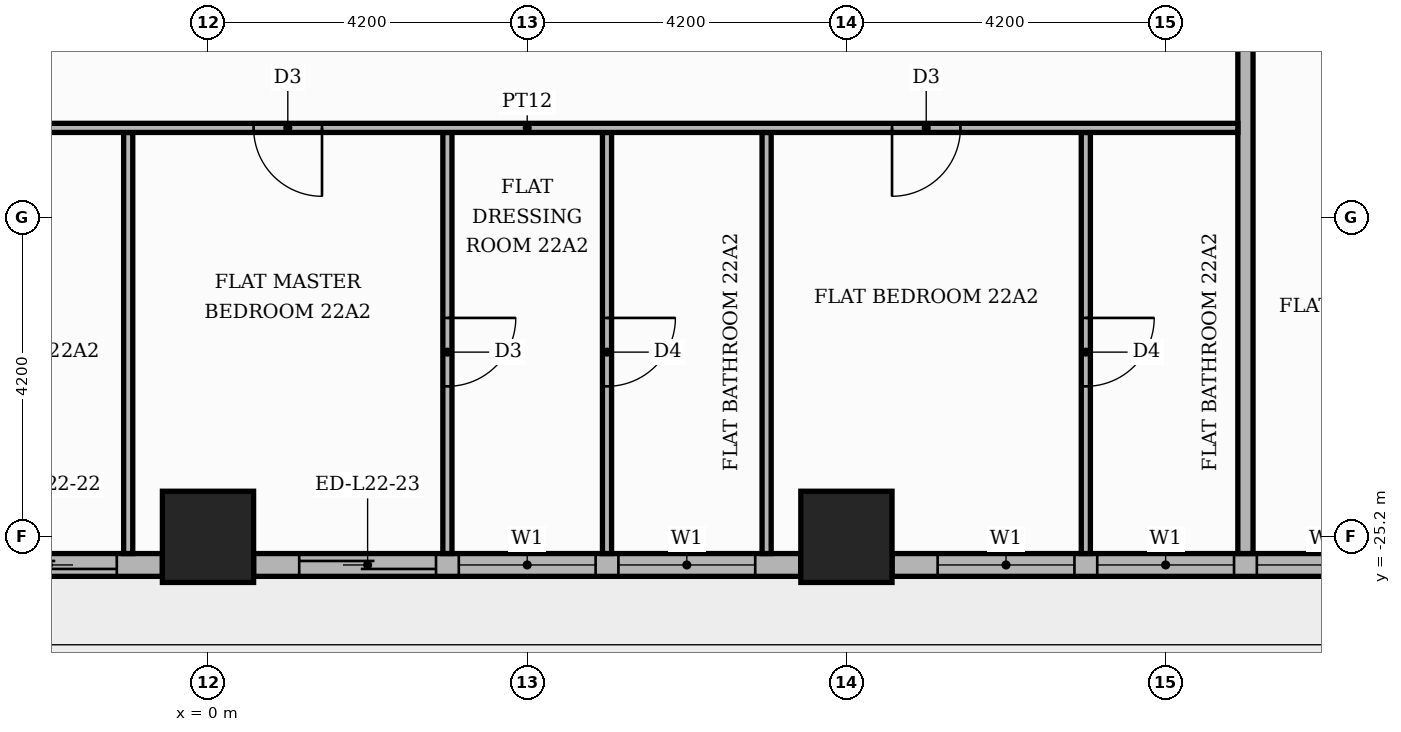
"""IFC4 building model, lengths in metres.
Left out: names, types, materials, properties, quantities, classifications, styles, units other than length and angle.
Written with IfcOpenShell. Run it as: python <this file> out.ifc"""

import sys

from ifc_helpers import new_model, si_unit, direction, frame, frame_2d, origin, origin_2d, place, context, subcontext, project, spatial, rectangle, extrude, element, fill, save


model = new_model("IFC4")
c1 = context("Model", 3, precision=1e-05, world=origin(), true_north=direction((0.0, 1.0)))
c2 = subcontext(c1, "Body", "Model", "MODEL_VIEW")
j1 = project(units=[si_unit("LENGTHUNIT", "METRE"), si_unit("PLANEANGLEUNIT", "RADIAN")], contexts=[c1])
p1 = place(None, origin())
s1 = spatial("IfcSite", under=j1, at=p1, CompositionType="ELEMENT")
p2 = place(p1, origin())
s2 = spatial("IfcBuilding", under=s1, at=p2, CompositionType="ELEMENT")
p3 = place(p2, frame((0.0, 0.0, 94.8)))
s3 = spatial("IfcBuildingStorey", under=s2, at=p3, CompositionType="ELEMENT", Elevation=94.8)
for number, where, z_axis, x_axis in (
    (1, (0.0, -25.2, 0.0), (0.0, 0.0, 1.0), (1.0, 0.0, 0.0)),
    (2, (8.4, -25.2, 0.0), (0.0, 0.0, 1.0), (1.0, 0.0, 0.0)),
):
    element("IfcColumn", number, at=place(p3, frame(where, z_axis=z_axis, x_axis=x_axis)), inside=s3, PredefinedType="COLUMN", context=c2, shape_type="SweptSolid", body=[
        extrude(rectangle(XDim=1.2, YDim=1.2, at=origin_2d()), origin(), (0.0, 0.0, 1.0), 3.9),
    ])
p4 = place(p3, frame((-7.8, -25.57, 0.0), z_axis=(0.0, 0.0, 1.0), x_axis=(1.0, 0.0, 0.0)))
e3 = element("IfcWall", 3, at=p4, inside=s3, PredefinedType="STANDARD", context=c2, shape_type="SweptSolid", body=[
    extrude(rectangle(XDim=7.2, YDim=0.3, at=frame_2d((3.6, 0.0))), origin(), (0.0, 0.0, 1.0), 3.48),
])
p5 = place(p4, frame((0.6, 0.0, 0.9)))
e4 = element("IfcOpeningElement", 4, at=p5, cuts=e3, PredefinedType="OPENING", context=c2, shape_type="SweptSolid", body=[
    extrude(rectangle(XDim=1.8, YDim=2.1, at=frame_2d((0.9, 1.05))), frame((0.0, 0.16, 0.0), z_axis=(0.0, -1.0, 0.0), x_axis=(1.0, 0.0, 0.0)), (0.0, 0.0, 1.0), 0.32),
])
p6 = place(p4, frame((2.7, 0.0, 0.9)))
e5 = element("IfcOpeningElement", 5, at=p6, cuts=e3, PredefinedType="OPENING", context=c2, shape_type="SweptSolid", body=[
    extrude(rectangle(XDim=1.8, YDim=2.1, at=frame_2d((0.9, 1.05))), frame((0.0, 0.16, 0.0), z_axis=(0.0, -1.0, 0.0), x_axis=(1.0, 0.0, 0.0)), (0.0, 0.0, 1.0), 0.32),
])
p7 = place(p4, frame((4.8, 0.0, 0.0)))
e6 = element("IfcOpeningElement", 6, at=p7, cuts=e3, PredefinedType="OPENING", context=c2, shape_type="SweptSolid", body=[
    extrude(rectangle(XDim=1.8, YDim=2.4, at=frame_2d((0.9, 1.2))), frame((0.0, 0.16, 0.0), z_axis=(0.0, -1.0, 0.0), x_axis=(1.0, 0.0, 0.0)), (0.0, 0.0, 1.0), 0.32),
])
p8 = place(p3, frame((0.6, -25.57, 0.0), z_axis=(0.0, 0.0, 1.0), x_axis=(1.0, 0.0, 0.0)))
e7 = element("IfcWall", 7, at=p8, inside=s3, PredefinedType="STANDARD", context=c2, shape_type="SweptSolid", body=[
    extrude(rectangle(XDim=7.2, YDim=0.3, at=frame_2d((3.6, 0.0))), origin(), (0.0, 0.0, 1.0), 3.48),
])
p9 = place(p8, frame((0.6, 0.0, 0.0)))
e8 = element("IfcOpeningElement", 8, at=p9, cuts=e7, PredefinedType="OPENING", context=c2, shape_type="SweptSolid", body=[
    extrude(rectangle(XDim=1.8, YDim=2.4, at=frame_2d((0.9, 1.2))), frame((0.0, 0.16, 0.0), z_axis=(0.0, -1.0, 0.0), x_axis=(1.0, 0.0, 0.0)), (0.0, 0.0, 1.0), 0.32),
])
p10 = place(p8, frame((2.7, 0.0, 0.9)))
e9 = element("IfcOpeningElement", 9, at=p10, cuts=e7, PredefinedType="OPENING", context=c2, shape_type="SweptSolid", body=[
    extrude(rectangle(XDim=1.8, YDim=2.1, at=frame_2d((0.9, 1.05))), frame((0.0, 0.16, 0.0), z_axis=(0.0, -1.0, 0.0), x_axis=(1.0, 0.0, 0.0)), (0.0, 0.0, 1.0), 0.32),
])
p11 = place(p8, frame((4.8, 0.0, 0.9)))
e10 = element("IfcOpeningElement", 10, at=p11, cuts=e7, PredefinedType="OPENING", context=c2, shape_type="SweptSolid", body=[
    extrude(rectangle(XDim=1.8, YDim=2.1, at=frame_2d((0.9, 1.05))), frame((0.0, 0.16, 0.0), z_axis=(0.0, -1.0, 0.0), x_axis=(1.0, 0.0, 0.0)), (0.0, 0.0, 1.0), 0.32),
])
p12 = place(p3, frame((9.0, -25.57, 0.0), z_axis=(0.0, 0.0, 1.0), x_axis=(1.0, 0.0, 0.0)))
e11 = element("IfcWall", 11, at=p12, inside=s3, PredefinedType="STANDARD", context=c2, shape_type="SweptSolid", body=[
    extrude(rectangle(XDim=7.2, YDim=0.3, at=frame_2d((3.6, 0.0))), origin(), (0.0, 0.0, 1.0), 3.48),
])
p13 = place(p12, frame((0.6, 0.0, 0.9)))
e12 = element("IfcOpeningElement", 12, at=p13, cuts=e11, PredefinedType="OPENING", context=c2, shape_type="SweptSolid", body=[
    extrude(rectangle(XDim=1.8, YDim=2.1, at=frame_2d((0.9, 1.05))), frame((0.0, 0.16, 0.0), z_axis=(0.0, -1.0, 0.0), x_axis=(1.0, 0.0, 0.0)), (0.0, 0.0, 1.0), 0.32),
])
p14 = place(p12, frame((2.7, 0.0, 0.9)))
e13 = element("IfcOpeningElement", 13, at=p14, cuts=e11, PredefinedType="OPENING", context=c2, shape_type="SweptSolid", body=[
    extrude(rectangle(XDim=1.8, YDim=2.1, at=frame_2d((0.9, 1.05))), frame((0.0, 0.16, 0.0), z_axis=(0.0, -1.0, 0.0), x_axis=(1.0, 0.0, 0.0)), (0.0, 0.0, 1.0), 0.32),
])
p15 = place(p12, frame((4.8, 0.0, 0.9)))
e14 = element("IfcOpeningElement", 14, at=p15, cuts=e11, PredefinedType="OPENING", context=c2, shape_type="SweptSolid", body=[
    extrude(rectangle(XDim=1.8, YDim=2.1, at=frame_2d((0.9, 1.05))), frame((0.0, 0.16, 0.0), z_axis=(0.0, -1.0, 0.0), x_axis=(1.0, 0.0, 0.0)), (0.0, 0.0, 1.0), 0.32),
])
p16 = place(p3, frame((-1.05, -25.42, 0.0), z_axis=(0.0, 0.0, 1.0), x_axis=(0.0, 1.0, 0.0)))
e15 = element("IfcWall", 15, at=p16, inside=s3, PredefinedType="PARTITIONING", context=c2, shape_type="SweptSolid", body=[
    extrude(rectangle(XDim=5.54, YDim=0.12, at=frame_2d((2.77, 0.0))), origin(), (0.0, 0.0, 1.0), 3.48),
])
p17 = place(p3, frame((3.15, -25.42, 0.0), z_axis=(0.0, 0.0, 1.0), x_axis=(0.0, 1.0, 0.0)))
e16 = element("IfcWall", 16, at=p17, inside=s3, PredefinedType="PARTITIONING", context=c2, shape_type="SweptSolid", body=[
    extrude(rectangle(XDim=5.54, YDim=0.12, at=frame_2d((2.77, 0.0))), origin(), (0.0, 0.0, 1.0), 3.48),
])
p18 = place(p17, frame((2.2, 0.0, 0.0)))
e17 = element("IfcOpeningElement", 17, at=p18, cuts=e16, PredefinedType="OPENING", context=c2, shape_type="SweptSolid", body=[
    extrude(rectangle(XDim=0.9, YDim=2.1, at=frame_2d((0.45, 1.05))), frame((0.0, 0.07, 0.0), z_axis=(0.0, -1.0, 0.0), x_axis=(1.0, 0.0, 0.0)), (0.0, 0.0, 1.0), 0.14),
])
p19 = place(p3, frame((5.25, -25.42, 0.0), z_axis=(0.0, 0.0, 1.0), x_axis=(0.0, 1.0, 0.0)))
e18 = element("IfcWall", 18, at=p19, inside=s3, PredefinedType="PARTITIONING", context=c2, shape_type="SweptSolid", body=[
    extrude(rectangle(XDim=5.54, YDim=0.12, at=frame_2d((2.77, 0.0))), origin(), (0.0, 0.0, 1.0), 3.48),
])
p20 = place(p19, frame((2.2, 0.0, 0.0)))
e19 = element("IfcOpeningElement", 19, at=p20, cuts=e18, PredefinedType="OPENING", context=c2, shape_type="SweptSolid", body=[
    extrude(rectangle(XDim=0.9, YDim=2.1, at=frame_2d((0.45, 1.05))), frame((0.0, 0.07, 0.0), z_axis=(0.0, -1.0, 0.0), x_axis=(1.0, 0.0, 0.0)), (0.0, 0.0, 1.0), 0.14),
])
p21 = place(p3, frame((7.35, -25.42, 0.0), z_axis=(0.0, 0.0, 1.0), x_axis=(0.0, 1.0, 0.0)))
e20 = element("IfcWall", 20, at=p21, inside=s3, PredefinedType="PARTITIONING", context=c2, shape_type="SweptSolid", body=[
    extrude(rectangle(XDim=5.54, YDim=0.12, at=frame_2d((2.77, 0.0))), origin(), (0.0, 0.0, 1.0), 3.48),
])
p22 = place(p3, frame((11.55, -25.42, 0.0), z_axis=(0.0, 0.0, 1.0), x_axis=(0.0, 1.0, 0.0)))
e21 = element("IfcWall", 21, at=p22, inside=s3, PredefinedType="PARTITIONING", context=c2, shape_type="SweptSolid", body=[
    extrude(rectangle(XDim=5.54, YDim=0.12, at=frame_2d((2.77, 0.0))), origin(), (0.0, 0.0, 1.0), 3.48),
])
p23 = place(p22, frame((2.2, 0.0, 0.0)))
e22 = element("IfcOpeningElement", 22, at=p23, cuts=e21, PredefinedType="OPENING", context=c2, shape_type="SweptSolid", body=[
    extrude(rectangle(XDim=0.9, YDim=2.1, at=frame_2d((0.45, 1.05))), frame((0.0, 0.07, 0.0), z_axis=(0.0, -1.0, 0.0), x_axis=(1.0, 0.0, 0.0)), (0.0, 0.0, 1.0), 0.14),
])
p24 = place(p3, frame((13.65, -25.42, 0.0), z_axis=(0.0, 0.0, 1.0), x_axis=(0.0, 1.0, 0.0)))
e23 = element("IfcWall", 23, at=p24, inside=s3, PredefinedType="PARTITIONING", context=c2, shape_type="SweptSolid", body=[
    extrude(rectangle(XDim=11.67, YDim=0.2, at=frame_2d((5.835, 0.0))), origin(), (0.0, 0.0, 1.0), 3.48),
])
p25 = place(p3, frame((-5.15, -19.82, 0.0), z_axis=(0.0, 0.0, 1.0), x_axis=(1.0, 0.0, 0.0)))
e24 = element("IfcWall", 24, at=p25, inside=s3, PredefinedType="PARTITIONING", context=c2, shape_type="SweptSolid", body=[
    extrude(rectangle(XDim=18.7, YDim=0.12, at=frame_2d((9.35, 0.0))), origin(), (0.0, 0.0, 1.0), 3.48),
])
p26 = place(p25, frame((1.5, 0.0, 0.0)))
e25 = element("IfcOpeningElement", 25, at=p26, cuts=e24, PredefinedType="OPENING", context=c2, shape_type="SweptSolid", body=[
    extrude(rectangle(XDim=1.0, YDim=2.1, at=frame_2d((0.5, 1.05))), frame((0.0, 0.07, 0.0), z_axis=(0.0, -1.0, 0.0), x_axis=(1.0, 0.0, 0.0)), (0.0, 0.0, 1.0), 0.14),
])
p27 = place(p25, frame((5.75, 0.0, 0.0)))
e26 = element("IfcOpeningElement", 26, at=p27, cuts=e24, PredefinedType="OPENING", context=c2, shape_type="SweptSolid", body=[
    extrude(rectangle(XDim=0.9, YDim=2.1, at=frame_2d((0.45, 1.05))), frame((0.0, 0.07, 0.0), z_axis=(0.0, -1.0, 0.0), x_axis=(1.0, 0.0, 0.0)), (0.0, 0.0, 1.0), 0.14),
])
p28 = place(p25, frame((14.15, 0.0, 0.0)))
e27 = element("IfcOpeningElement", 27, at=p28, cuts=e24, PredefinedType="OPENING", context=c2, shape_type="SweptSolid", body=[
    extrude(rectangle(XDim=0.9, YDim=2.1, at=frame_2d((0.45, 1.05))), frame((0.0, 0.07, 0.0), z_axis=(0.0, -1.0, 0.0), x_axis=(1.0, 0.0, 0.0)), (0.0, 0.0, 1.0), 0.14),
])
p29 = place(p7, origin())
e28 = element("IfcDoor", 28, at=p29, inside=s3, OperationType="SLIDING_TO_RIGHT", PredefinedType="DOOR", context=c2, shape_type="SweptSolid", body=[
    extrude(rectangle(XDim=1.8, YDim=2.4, at=frame_2d((0.9, 1.2))), frame((0.0, 0.025, 0.0), z_axis=(0.0, -1.0, 0.0), x_axis=(1.0, 0.0, 0.0)), (0.0, 0.0, 1.0), 0.05),
])
fill(e6, e28)
p30 = place(p9, origin())
e29 = element("IfcDoor", 29, at=p30, inside=s3, OperationType="SLIDING_TO_LEFT", PredefinedType="DOOR", context=c2, shape_type="SweptSolid", body=[
    extrude(rectangle(XDim=1.8, YDim=2.4, at=frame_2d((0.9, 1.2))), frame((0.0, 0.025, 0.0), z_axis=(0.0, -1.0, 0.0), x_axis=(1.0, 0.0, 0.0)), (0.0, 0.0, 1.0), 0.05),
])
fill(e8, e29)
p31 = place(p10, origin())
e30 = element("IfcWindow", 30, at=p31, inside=s3, PartitioningType="SINGLE_PANEL", PredefinedType="WINDOW", context=c2, shape_type="SweptSolid", body=[
    extrude(rectangle(XDim=1.8, YDim=2.1, at=frame_2d((0.9, 1.05))), frame((0.0, 0.03, 0.0), z_axis=(0.0, -1.0, 0.0), x_axis=(1.0, 0.0, 0.0)), (0.0, 0.0, 1.0), 0.06),
])
fill(e9, e30)
p32 = place(p11, origin())
e31 = element("IfcWindow", 31, at=p32, inside=s3, PartitioningType="SINGLE_PANEL", PredefinedType="WINDOW", context=c2, shape_type="SweptSolid", body=[
    extrude(rectangle(XDim=1.8, YDim=2.1, at=frame_2d((0.9, 1.05))), frame((0.0, 0.03, 0.0), z_axis=(0.0, -1.0, 0.0), x_axis=(1.0, 0.0, 0.0)), (0.0, 0.0, 1.0), 0.06),
])
fill(e10, e31)
p33 = place(p13, origin())
e32 = element("IfcWindow", 32, at=p33, inside=s3, PartitioningType="SINGLE_PANEL", PredefinedType="WINDOW", context=c2, shape_type="SweptSolid", body=[
    extrude(rectangle(XDim=1.8, YDim=2.1, at=frame_2d((0.9, 1.05))), frame((0.0, 0.03, 0.0), z_axis=(0.0, -1.0, 0.0), x_axis=(1.0, 0.0, 0.0)), (0.0, 0.0, 1.0), 0.06),
])
fill(e12, e32)
p34 = place(p14, origin())
e33 = element("IfcWindow", 33, at=p34, inside=s3, PartitioningType="SINGLE_PANEL", PredefinedType="WINDOW", context=c2, shape_type="SweptSolid", body=[
    extrude(rectangle(XDim=1.8, YDim=2.1, at=frame_2d((0.9, 1.05))), frame((0.0, 0.03, 0.0), z_axis=(0.0, -1.0, 0.0), x_axis=(1.0, 0.0, 0.0)), (0.0, 0.0, 1.0), 0.06),
])
fill(e13, e33)
p35 = place(p15, origin())
e34 = element("IfcWindow", 34, at=p35, inside=s3, PartitioningType="SINGLE_PANEL", PredefinedType="WINDOW", context=c2, shape_type="SweptSolid", body=[
    extrude(rectangle(XDim=1.8, YDim=2.1, at=frame_2d((0.9, 1.05))), frame((0.0, 0.03, 0.0), z_axis=(0.0, -1.0, 0.0), x_axis=(1.0, 0.0, 0.0)), (0.0, 0.0, 1.0), 0.06),
])
fill(e14, e34)
p36 = place(p27, frame((0.9, 0.0, 0.0), z_axis=(0.0, 0.0, 1.0), x_axis=(-1.0, 0.0, 0.0)))
e35 = element("IfcDoor", 35, at=p36, inside=s3, OperationType="SINGLE_SWING_RIGHT", PredefinedType="DOOR", context=c2, shape_type="SweptSolid", body=[
    extrude(rectangle(XDim=0.9, YDim=2.1, at=frame_2d((0.45, 1.05))), frame((0.0, 0.025, 0.0), z_axis=(0.0, -1.0, 0.0), x_axis=(1.0, 0.0, 0.0)), (0.0, 0.0, 1.0), 0.05),
])
fill(e26, e35)
p37 = place(p18, frame((0.9, 0.0, 0.0), z_axis=(0.0, 0.0, 1.0), x_axis=(-1.0, 0.0, 0.0)))
e36 = element("IfcDoor", 36, at=p37, inside=s3, OperationType="SINGLE_SWING_RIGHT", PredefinedType="DOOR", context=c2, shape_type="SweptSolid", body=[
    extrude(rectangle(XDim=0.9, YDim=2.1, at=frame_2d((0.45, 1.05))), frame((0.0, 0.025, 0.0), z_axis=(0.0, -1.0, 0.0), x_axis=(1.0, 0.0, 0.0)), (0.0, 0.0, 1.0), 0.05),
])
fill(e17, e36)
p38 = place(p20, frame((0.9, 0.0, 0.0), z_axis=(0.0, 0.0, 1.0), x_axis=(-1.0, 0.0, 0.0)))
e37 = element("IfcDoor", 37, at=p38, inside=s3, OperationType="SINGLE_SWING_RIGHT", PredefinedType="DOOR", context=c2, shape_type="SweptSolid", body=[
    extrude(rectangle(XDim=0.9, YDim=2.1, at=frame_2d((0.45, 1.05))), frame((0.0, 0.025, 0.0), z_axis=(0.0, -1.0, 0.0), x_axis=(1.0, 0.0, 0.0)), (0.0, 0.0, 1.0), 0.05),
])
fill(e19, e37)
p39 = place(p28, frame((0.9, 0.0, 0.0), z_axis=(0.0, 0.0, 1.0), x_axis=(-1.0, 0.0, 0.0)))
e38 = element("IfcDoor", 38, at=p39, inside=s3, OperationType="SINGLE_SWING_LEFT", PredefinedType="DOOR", context=c2, shape_type="SweptSolid", body=[
    extrude(rectangle(XDim=0.9, YDim=2.1, at=frame_2d((0.45, 1.05))), frame((0.0, 0.025, 0.0), z_axis=(0.0, -1.0, 0.0), x_axis=(1.0, 0.0, 0.0)), (0.0, 0.0, 1.0), 0.05),
])
fill(e27, e38)
p40 = place(p23, frame((0.9, 0.0, 0.0), z_axis=(0.0, 0.0, 1.0), x_axis=(-1.0, 0.0, 0.0)))
e39 = element("IfcDoor", 39, at=p40, inside=s3, OperationType="SINGLE_SWING_RIGHT", PredefinedType="DOOR", context=c2, shape_type="SweptSolid", body=[
    extrude(rectangle(XDim=0.9, YDim=2.1, at=frame_2d((0.45, 1.05))), frame((0.0, 0.025, 0.0), z_axis=(0.0, -1.0, 0.0), x_axis=(1.0, 0.0, 0.0)), (0.0, 0.0, 1.0), 0.05),
])
fill(e22, e39)
save(model, sys.argv[1])
